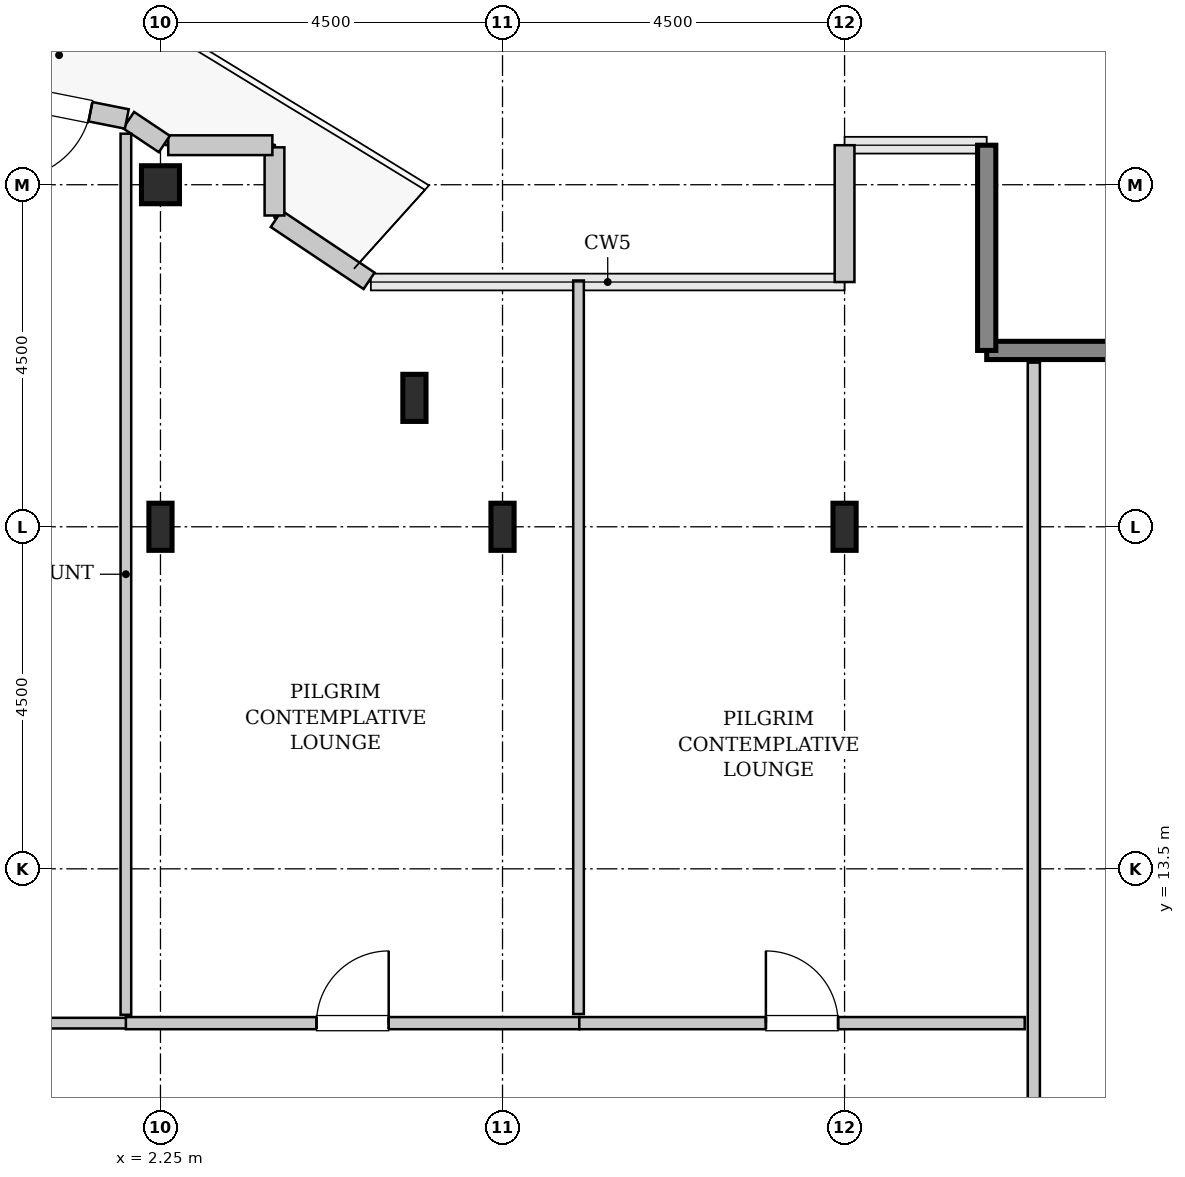
"""IFC4 building model, lengths in metres.
Left out: names, types, materials, properties, quantities, classifications, styles, units other than length and angle.
Written with IfcOpenShell. Run it as: python <this file> out.ifc"""

import sys

from ifc_helpers import new_model, si_unit, direction, frame, frame_2d, origin, origin_2d, place, context, subcontext, project, spatial, rectangle, hollow_rectangle, i_section, extrude, source, transform, mapped, element, fill, save


model = new_model("IFC4")
c1 = context("Model", 3, precision=1e-05, world=origin(), true_north=direction((0.0, 1.0)))
c2 = subcontext(c1, "Body", "Model", "MODEL_VIEW")
j1 = project(units=[si_unit("LENGTHUNIT", "METRE"), si_unit("PLANEANGLEUNIT", "RADIAN")], contexts=[c1])
p1 = place(None, origin())
s1 = spatial("IfcSite", under=j1, at=p1, CompositionType="ELEMENT")
p2 = place(p1, origin())
s2 = spatial("IfcBuilding", under=s1, at=p2, CompositionType="ELEMENT")
p3 = place(p2, frame((0.0, 0.0, 322.4)))
s3 = spatial("IfcBuildingStorey", under=s2, at=p3, CompositionType="ELEMENT", Elevation=322.4)
m1 = source(origin(), c2, "Body", "SweptSolid", [
    extrude(i_section(OverallWidth=0.305, OverallDepth=0.62, WebThickness=0.021, FlangeThickness=0.04, FilletRadius=0.027, at=origin_2d()), origin(), (0.0, 0.0, 1.0), 3.8),
])
p4 = place(p3, frame((2.25, 18.0, 0.0), z_axis=(0.0, 0.0, 1.0), x_axis=(1.0, 0.0, 0.0)))
e1 = element("IfcColumn", 1, at=p4, inside=s3, PredefinedType="COLUMN", context=c2, shape_type="MappedRepresentation", body=[
    mapped(m1, transform((0.0, 0.0, 0.0), x_axis=(1.0, 0.0, 0.0), y_axis=(0.0, 1.0, 0.0), z_axis=(0.0, 0.0, 1.0), scale=1.0)),
])
m2 = source(origin(), c2, "Body", "SweptSolid", [
    extrude(hollow_rectangle(XDim=0.5, YDim=0.5, WallThickness=0.025, InnerFilletRadius=0.025, OuterFilletRadius=0.05, at=origin_2d()), origin(), (0.0, 0.0, 1.0), 3.8),
])
p5 = place(p3, frame((2.25, 22.5, 0.0), z_axis=(0.0, 0.0, 1.0), x_axis=(1.0, 0.0, 0.0)))
e2 = element("IfcColumn", 2, at=p5, inside=s3, PredefinedType="COLUMN", context=c2, shape_type="MappedRepresentation", body=[
    mapped(m2, transform((0.0, 0.0, 0.0), x_axis=(1.0, 0.0, 0.0), y_axis=(0.0, 1.0, 0.0), z_axis=(0.0, 0.0, 1.0), scale=1.0)),
])
for number, where, z_axis, x_axis in (
    (3, (5.591, 19.696, 0.0), (0.0, 0.0, 1.0), (1.0, 0.0, 0.0)),
    (4, (6.75, 18.0, 0.0), (0.0, 0.0, 1.0), (1.0, 0.0, 0.0)),
    (5, (11.25, 18.0, 0.0), (0.0, 0.0, 1.0), (1.0, 0.0, 0.0)),
):
    element("IfcColumn", number, at=place(p3, frame(where, z_axis=z_axis, x_axis=x_axis)), inside=s3, PredefinedType="COLUMN", context=c2, shape_type="MappedRepresentation", body=[
        mapped(m1, transform((0.0, 0.0, 0.0), x_axis=(1.0, 0.0, 0.0), y_axis=(0.0, 1.0, 0.0), z_axis=(0.0, 0.0, 1.0), scale=1.0)),
    ])
m3 = source(origin(), c2, "Body", "SweptSolid", [
    extrude(rectangle(XDim=2.7, YDim=0.24, at=frame_2d((1.35, 0.0))), origin(), (0.0, 0.0, 1.0), 3.55),
])
for number, where, z_axis, x_axis in (
    (6, (15.82, 20.32, 0.0), (0.0, 0.0, 1.0), (-1.0, 0.0, 0.0)),
    (7, (13.12, 20.32, 0.0), (0.0, 0.0, 1.0), (0.0, 1.0, 0.0)),
):
    element("IfcWall", number, at=place(p3, frame(where, z_axis=z_axis, x_axis=x_axis)), inside=s3, PredefinedType="SHEAR", context=c2, shape_type="MappedRepresentation", body=[
        mapped(m3, transform((0.0, 0.0, 0.0), x_axis=(1.0, 0.0, 0.0), y_axis=(0.0, 1.0, 0.0), z_axis=(0.0, 0.0, 1.0), scale=1.0)),
    ])
m4 = source(origin(), c2, "Body", "SweptSolid", [
    extrude(rectangle(XDim=1.8, YDim=0.26, at=frame_2d((0.9, 0.0))), origin(), (0.0, 0.0, 1.0), 3.55),
])
p6 = place(p3, frame((11.25, 23.02, 0.0), z_axis=(0.0, 0.0, 1.0), x_axis=(0.0, -1.0, 0.0)))
e8 = element("IfcWall", 8, at=p6, inside=s3, PredefinedType="SOLIDWALL", context=c2, shape_type="MappedRepresentation", body=[
    mapped(m4, transform((0.0, 0.0, 0.0), x_axis=(1.0, 0.0, 0.0), y_axis=(0.0, 1.0, 0.0), z_axis=(0.0, 0.0, 1.0), scale=1.0)),
])
m5 = source(origin(), c2, "Body", "SweptSolid", [
    extrude(rectangle(XDim=1.469, YDim=0.26, at=frame_2d((0.734, 0.0))), origin(), (0.0, 0.0, 1.0), 3.55),
])
p7 = place(p3, frame((4.995, 21.236, 0.0), z_axis=(0.0, 0.0, 1.0), x_axis=(-0.831461760506, 0.555581983884, 0.0)))
e9 = element("IfcWall", 9, at=p7, inside=s3, PredefinedType="SOLIDWALL", context=c2, shape_type="MappedRepresentation", body=[
    mapped(m5, transform((0.0, 0.0, 0.0), x_axis=(1.0, 0.0, 0.0), y_axis=(0.0, 1.0, 0.0), z_axis=(0.0, 0.0, 1.0), scale=1.0)),
])
m6 = source(origin(), c2, "Body", "SweptSolid", [
    extrude(rectangle(XDim=0.897, YDim=0.26, at=frame_2d((0.448, 0.0))), origin(), (0.0, 0.0, 1.0), 3.55),
])
p8 = place(p3, frame((3.75, 22.095, 0.0), z_axis=(0.0, 0.0, 1.0), x_axis=(0.0, 1.0, 0.0)))
e10 = element("IfcWall", 10, at=p8, inside=s3, PredefinedType="SOLIDWALL", context=c2, shape_type="MappedRepresentation", body=[
    mapped(m6, transform((0.0, 0.0, 0.0), x_axis=(1.0, 0.0, 0.0), y_axis=(0.0, 1.0, 0.0), z_axis=(0.0, 0.0, 1.0), scale=1.0)),
])
m7 = source(origin(), c2, "Body", "SweptSolid", [
    extrude(rectangle(XDim=1.37, YDim=0.26, at=frame_2d((0.685, 0.0))), origin(), (0.0, 0.0, 1.0), 3.55),
])
p9 = place(p3, frame((3.722, 23.02, 0.0), z_axis=(0.0, 0.0, 1.0), x_axis=(-1.0, 0.0, 0.0)))
e11 = element("IfcWall", 11, at=p9, inside=s3, PredefinedType="SOLIDWALL", context=c2, shape_type="MappedRepresentation", body=[
    mapped(m7, transform((0.0, 0.0, 0.0), x_axis=(1.0, 0.0, 0.0), y_axis=(0.0, 1.0, 0.0), z_axis=(0.0, 0.0, 1.0), scale=1.0)),
])
m8 = source(origin(), c2, "Body", "SweptSolid", [
    extrude(rectangle(XDim=0.565, YDim=0.26, at=frame_2d((0.283, 0.0))), origin(), (0.0, 0.0, 1.0), 3.55),
])
p10 = place(p3, frame((2.301, 23.036, 0.0), z_axis=(0.0, 0.0, 1.0), x_axis=(-0.831651492666, 0.555297933317, 0.0)))
e12 = element("IfcWall", 12, at=p10, inside=s3, PredefinedType="SOLIDWALL", context=c2, shape_type="MappedRepresentation", body=[
    mapped(m8, transform((0.0, 0.0, 0.0), x_axis=(1.0, 0.0, 0.0), y_axis=(0.0, 1.0, 0.0), z_axis=(0.0, 0.0, 1.0), scale=1.0)),
])
m9 = source(origin(), c2, "Body", "SweptSolid", [
    extrude(rectangle(XDim=4.137, YDim=0.26, at=frame_2d((2.068, 0.0))), origin(), (0.0, 0.0, 1.0), 3.55),
])
p11 = place(p3, frame((1.807, 23.365, 0.0), z_axis=(0.0, 0.0, 1.0), x_axis=(-0.980782170794, 0.195105954428, 0.0)))
e13 = element("IfcWall", 13, at=p11, inside=s3, PredefinedType="SOLIDWALL", context=c2, shape_type="MappedRepresentation", body=[
    mapped(m9, transform((0.0, 0.0, 0.0), x_axis=(1.0, 0.0, 0.0), y_axis=(0.0, 1.0, 0.0), z_axis=(0.0, 0.0, 1.0), scale=1.0)),
])
p12 = place(p11, frame((0.488, 0.0, 0.0)))
e14 = element("IfcOpeningElement", 14, at=p12, cuts=e13, PredefinedType="OPENING", context=c2, shape_type="SweptSolid", body=[
    extrude(rectangle(XDim=1.1, YDim=2.2, at=frame_2d((0.55, 1.1))), frame((0.0, 0.14, 0.0), z_axis=(0.0, -1.0, 0.0), x_axis=(1.0, 0.0, 0.0)), (0.0, 0.0, 1.0), 0.28),
])
m10 = source(origin(), c2, "Body", "SweptSolid", [
    extrude(rectangle(XDim=12.365, YDim=0.16, at=frame_2d((6.183, 0.0))), origin(), (0.0, 0.0, 1.0), 3.535),
])
p13 = place(p3, frame((13.74, 7.795, 0.0), z_axis=(0.0, 0.0, 1.0), x_axis=(0.0, 1.0, 0.0)))
e15 = element("IfcWall", 15, at=p13, inside=s3, PredefinedType="PARTITIONING", context=c2, shape_type="MappedRepresentation", body=[
    mapped(m10, transform((0.0, 0.0, 0.0), x_axis=(1.0, 0.0, 0.0), y_axis=(0.0, 1.0, 0.0), z_axis=(0.0, 0.0, 1.0), scale=1.0)),
])
p14 = place(p13, frame((1.383, 0.0, 0.0)))
e16 = element("IfcOpeningElement", 16, at=p14, cuts=e15, PredefinedType="OPENING", context=c2, shape_type="SweptSolid", body=[
    extrude(rectangle(XDim=0.95, YDim=2.1, at=frame_2d((0.475, 1.05))), frame((0.0, 0.09, 0.0), z_axis=(0.0, -1.0, 0.0), x_axis=(1.0, 0.0, 0.0)), (0.0, 0.0, 1.0), 0.18),
])
m11 = source(origin(), c2, "Body", "SweptSolid", [
    extrude(rectangle(XDim=4.625, YDim=0.14, at=frame_2d((2.312, 0.0))), origin(), (0.0, 0.0, 1.0), 3.535),
])
p15 = place(p3, frame((-2.82, 11.47, 0.0), z_axis=(0.0, 0.0, 1.0), x_axis=(1.0, 0.0, 0.0)))
e17 = element("IfcWall", 17, at=p15, inside=s3, PredefinedType="PARTITIONING", context=c2, shape_type="MappedRepresentation", body=[
    mapped(m11, transform((0.0, 0.0, 0.0), x_axis=(1.0, 0.0, 0.0), y_axis=(0.0, 1.0, 0.0), z_axis=(0.0, 0.0, 1.0), scale=1.0)),
])
m12 = source(origin(), c2, "Body", "SweptSolid", [
    extrude(rectangle(XDim=11.591, YDim=0.14, at=frame_2d((5.796, 0.0))), origin(), (0.0, 0.0, 1.0), 2.975),
])
p16 = place(p3, frame((1.795, 11.58, 0.0), z_axis=(0.0, 0.0, 1.0), x_axis=(0.0, 1.0, 0.0)))
e18 = element("IfcWall", 18, at=p16, inside=s3, PredefinedType="PARTITIONING", context=c2, shape_type="MappedRepresentation", body=[
    mapped(m12, transform((0.0, 0.0, 0.0), x_axis=(1.0, 0.0, 0.0), y_axis=(0.0, 1.0, 0.0), z_axis=(0.0, 0.0, 1.0), scale=1.0)),
])
m13 = source(origin(), c2, "Body", "SweptSolid", [
    extrude(rectangle(XDim=5.965, YDim=0.16, at=frame_2d((2.982, 0.0))), origin(), (0.0, 0.0, 1.0), 3.535),
])
p17 = place(p3, frame((1.795, 11.47, 0.0), z_axis=(0.0, 0.0, 1.0), x_axis=(1.0, 0.0, 0.0)))
e19 = element("IfcWall", 19, at=p17, inside=s3, PredefinedType="PARTITIONING", context=c2, shape_type="MappedRepresentation", body=[
    mapped(m13, transform((0.0, 0.0, 0.0), x_axis=(1.0, 0.0, 0.0), y_axis=(0.0, 1.0, 0.0), z_axis=(0.0, 0.0, 1.0), scale=1.0)),
])
p18 = place(p17, frame((2.508, 0.0, 0.0)))
e20 = element("IfcOpeningElement", 20, at=p18, cuts=e19, PredefinedType="OPENING", context=c2, shape_type="SweptSolid", body=[
    extrude(rectangle(XDim=0.95, YDim=2.1, at=frame_2d((0.475, 1.05))), frame((0.0, 0.09, 0.0), z_axis=(0.0, -1.0, 0.0), x_axis=(1.0, 0.0, 0.0)), (0.0, 0.0, 1.0), 0.18),
])
m14 = source(origin(), c2, "Body", "SweptSolid", [
    extrude(rectangle(XDim=9.65, YDim=0.14, at=frame_2d((4.825, 0.0))), origin(), (0.0, 0.0, 1.0), 3.535),
])
p19 = place(p3, frame((7.75, 11.59, 0.0), z_axis=(0.0, 0.0, 1.0), x_axis=(0.0, 1.0, 0.0)))
e21 = element("IfcWall", 21, at=p19, inside=s3, PredefinedType="PARTITIONING", context=c2, shape_type="MappedRepresentation", body=[
    mapped(m14, transform((0.0, 0.0, 0.0), x_axis=(1.0, 0.0, 0.0), y_axis=(0.0, 1.0, 0.0), z_axis=(0.0, 0.0, 1.0), scale=1.0)),
])
m15 = source(origin(), c2, "Body", "SweptSolid", [
    extrude(rectangle(XDim=5.86, YDim=0.16, at=frame_2d((2.93, 0.0))), origin(), (0.0, 0.0, 1.0), 3.535),
])
p20 = place(p3, frame((7.76, 11.47, 0.0), z_axis=(0.0, 0.0, 1.0), x_axis=(1.0, 0.0, 0.0)))
e22 = element("IfcWall", 22, at=p20, inside=s3, PredefinedType="PARTITIONING", context=c2, shape_type="MappedRepresentation", body=[
    mapped(m15, transform((0.0, 0.0, 0.0), x_axis=(1.0, 0.0, 0.0), y_axis=(0.0, 1.0, 0.0), z_axis=(0.0, 0.0, 1.0), scale=1.0)),
])
p21 = place(p20, frame((2.455, 0.0, 0.0)))
e23 = element("IfcOpeningElement", 23, at=p21, cuts=e22, PredefinedType="OPENING", context=c2, shape_type="SweptSolid", body=[
    extrude(rectangle(XDim=0.95, YDim=2.1, at=frame_2d((0.475, 1.05))), frame((0.0, 0.09, 0.0), z_axis=(0.0, -1.0, 0.0), x_axis=(1.0, 0.0, 0.0)), (0.0, 0.0, 1.0), 0.18),
])
m16 = source(origin(), c2, "Body", "SweptSolid", [
    extrude(rectangle(XDim=1.1, YDim=2.2, at=frame_2d((0.55, 1.1))), frame((0.0, 0.025, 0.0), z_axis=(0.0, -1.0, 0.0), x_axis=(1.0, 0.0, 0.0)), (0.0, 0.0, 1.0), 0.05),
])
p22 = place(p12, origin())
e24 = element("IfcDoor", 24, at=p22, inside=s3, OperationType="SINGLE_SWING_RIGHT", PredefinedType="DOOR", context=c2, shape_type="MappedRepresentation", body=[
    mapped(m16, transform((0.0, 0.0, 0.0), x_axis=(1.0, 0.0, 0.0), y_axis=(0.0, 1.0, 0.0), z_axis=(0.0, 0.0, 1.0), scale=1.0)),
])
fill(e14, e24)
m17 = source(origin(), c2, "Body", "SweptSolid", [
    extrude(rectangle(XDim=0.95, YDim=2.1, at=frame_2d((0.475, 1.05))), frame((0.0, 0.025, 0.0), z_axis=(0.0, -1.0, 0.0), x_axis=(1.0, 0.0, 0.0)), (0.0, 0.0, 1.0), 0.05),
])
p23 = place(p18, origin())
e25 = element("IfcDoor", 25, at=p23, inside=s3, OperationType="SINGLE_SWING_RIGHT", PredefinedType="DOOR", context=c2, shape_type="MappedRepresentation", body=[
    mapped(m17, transform((0.0, 0.0, 0.0), x_axis=(1.0, 0.0, 0.0), y_axis=(0.0, 1.0, 0.0), z_axis=(0.0, 0.0, 1.0), scale=1.0)),
])
fill(e20, e25)
p24 = place(p21, origin())
e26 = element("IfcDoor", 26, at=p24, inside=s3, OperationType="SINGLE_SWING_LEFT", PredefinedType="DOOR", context=c2, shape_type="MappedRepresentation", body=[
    mapped(m17, transform((0.0, 0.0, 0.0), x_axis=(1.0, 0.0, 0.0), y_axis=(0.0, 1.0, 0.0), z_axis=(0.0, 0.0, 1.0), scale=1.0)),
])
fill(e23, e26)
save(model, sys.argv[1])
